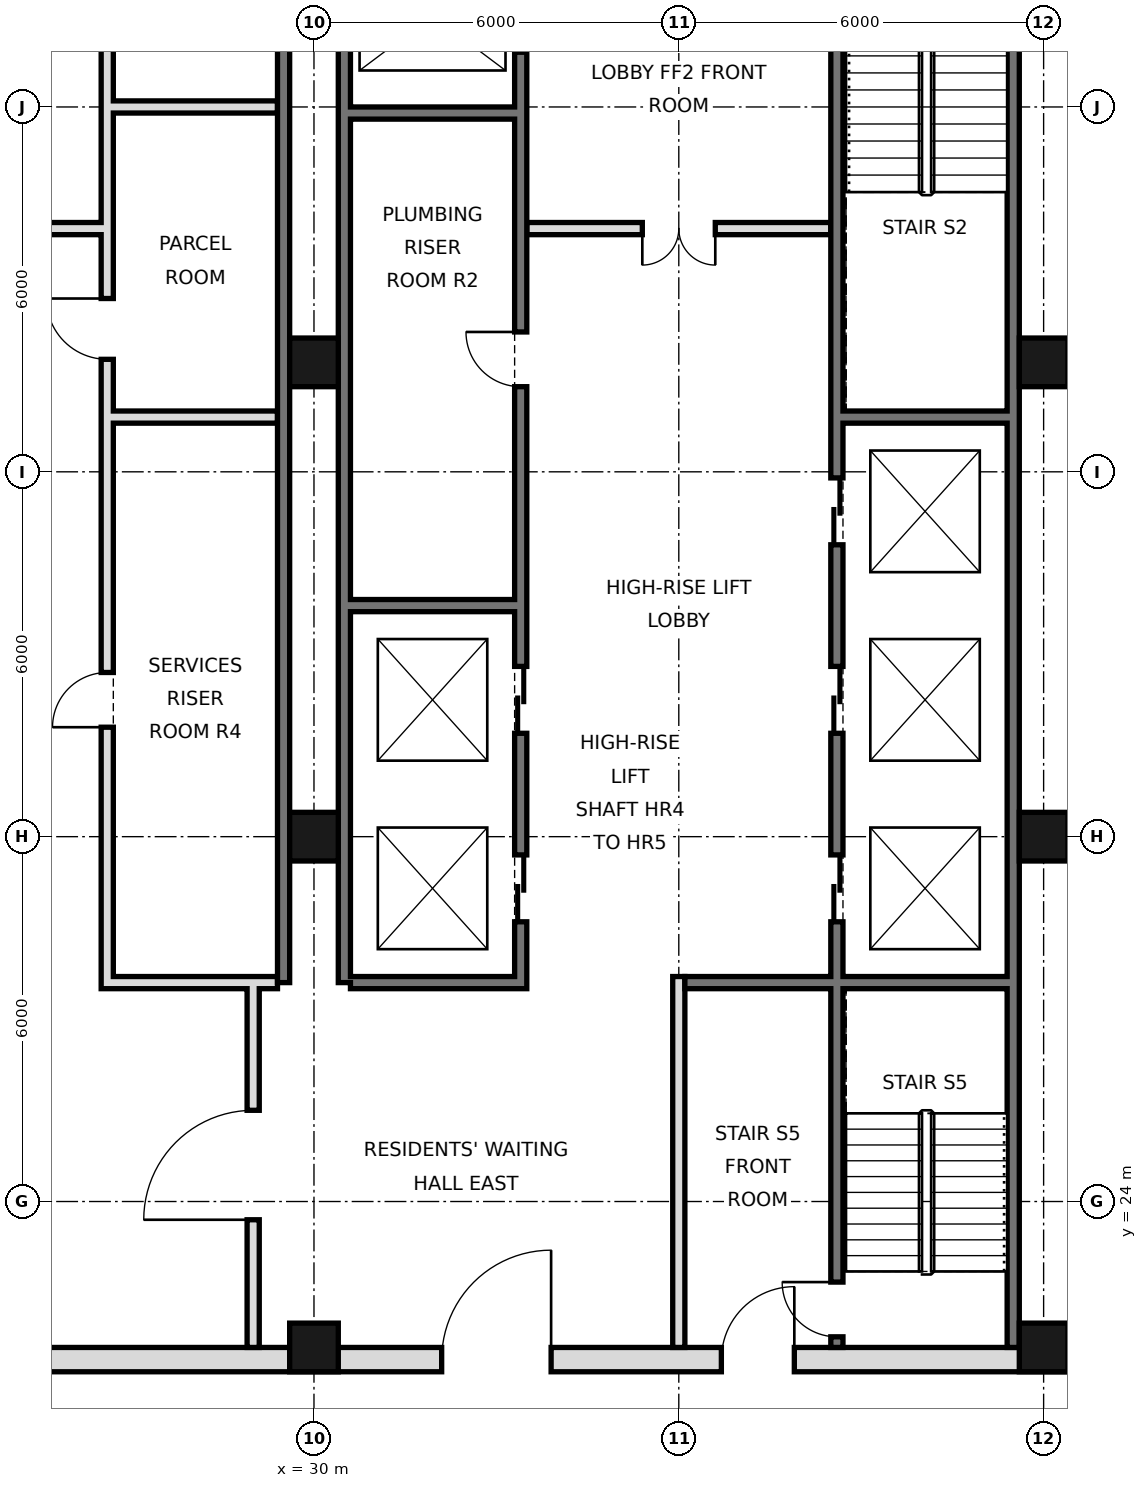
"""IFC4 building model, lengths in metres.
Left out: names, types, materials, properties, quantities, classifications, styles, units other than length and angle.
Written with IfcOpenShell. Run it as: python <this file> out.ifc"""

import sys

from ifc_helpers import new_model, si_unit, direction, frame, frame_2d, origin, origin_2d, place, context, subcontext, project, spatial, rectangle, hollow_rectangle, extrude, element, fill, save


model = new_model("IFC4")
c1 = context("Model", 3, precision=1e-05, world=origin(), true_north=direction((0.0, 1.0)))
c2 = subcontext(c1, "Body", "Model", "MODEL_VIEW")
j1 = project(units=[si_unit("LENGTHUNIT", "METRE"), si_unit("PLANEANGLEUNIT", "RADIAN")], contexts=[c1])
p1 = place(None, origin())
s1 = spatial("IfcSite", under=j1, at=p1, CompositionType="ELEMENT")
p2 = place(p1, origin())
s2 = spatial("IfcBuilding", under=s1, at=p2, CompositionType="ELEMENT")
p3 = place(p2, frame((0.0, 0.0, 202.8)))
s3 = spatial("IfcBuildingStorey", under=s2, at=p3, CompositionType="ELEMENT", Elevation=202.8)
for number, where, z_axis, x_axis in (
    (1, (30.0, 21.6, 0.0), (0.0, 0.0, 1.0), (1.0, 0.0, 0.0)),
    (2, (30.0, 30.0, 0.0), (0.0, 0.0, 1.0), (1.0, 0.0, 0.0)),
    (3, (30.0, 37.8, 0.0), (0.0, 0.0, 1.0), (1.0, 0.0, 0.0)),
    (4, (42.0, 21.6, 0.0), (0.0, 0.0, 1.0), (1.0, 0.0, 0.0)),
    (5, (42.0, 30.0, 0.0), (0.0, 0.0, 1.0), (1.0, 0.0, 0.0)),
    (6, (42.0, 37.8, 0.0), (0.0, 0.0, 1.0), (1.0, 0.0, 0.0)),
):
    element("IfcColumn", number, at=place(p3, frame(where, z_axis=z_axis, x_axis=x_axis)), inside=s3, PredefinedType="COLUMN", context=c2, shape_type="SweptSolid", body=[
        extrude(hollow_rectangle(XDim=0.8, YDim=0.8, WallThickness=0.04, at=origin_2d()), origin(), (0.0, 0.0, 1.0), 3.6),
    ])
p4 = place(p3, frame((41.5, 21.6, 0.0), z_axis=(0.0, 0.0, 1.0), x_axis=(0.0, 1.0, 0.0)))
e7 = element("IfcWall", 7, at=p4, inside=s3, PredefinedType="SOLIDWALL", context=c2, shape_type="SweptSolid", body=[
    extrude(rectangle(XDim=23.5, YDim=0.2, at=frame_2d((11.75, 0.0))), origin(), (0.0, 0.0, 1.0), 3.42),
])
for number, where, z_axis, x_axis in (
    (8, (29.5, 27.6, 0.0), (0.0, 0.0, 1.0), (0.0, 1.0, 0.0)),
    (9, (30.5, 27.6, 0.0), (0.0, 0.0, 1.0), (0.0, 1.0, 0.0)),
):
    element("IfcWall", number, at=place(p3, frame(where, z_axis=z_axis, x_axis=x_axis)), inside=s3, PredefinedType="SOLIDWALL", context=c2, shape_type="SweptSolid", body=[
        extrude(rectangle(XDim=17.5, YDim=0.2, at=frame_2d((8.75, 0.0))), origin(), (0.0, 0.0, 1.0), 3.42),
    ])
p5 = place(p3, frame((5.6, 21.4, 0.0), z_axis=(0.0, 0.0, 1.0), x_axis=(1.0, 0.0, 0.0)))
e10 = element("IfcWall", 10, at=p5, inside=s3, PredefinedType="SOLIDWALL", context=c2, shape_type="SweptSolid", body=[
    extrude(rectangle(XDim=36.8, YDim=0.4, at=frame_2d((18.4, 0.0))), origin(), (0.0, 0.0, 1.0), 3.42),
])
p6 = place(p5, frame((8.5, 0.0, 0.0)))
e11 = element("IfcOpeningElement", 11, at=p6, cuts=e10, PredefinedType="OPENING", context=c2, shape_type="SweptSolid", body=[
    extrude(rectangle(XDim=1.8, YDim=2.1, at=frame_2d((0.9, 1.05))), frame((0.0, 0.21, 0.0), z_axis=(0.0, -1.0, 0.0), x_axis=(1.0, 0.0, 0.0)), (0.0, 0.0, 1.0), 0.42),
])
p7 = place(p5, frame((17.5, 0.0, 0.0)))
e12 = element("IfcOpeningElement", 12, at=p7, cuts=e10, PredefinedType="OPENING", context=c2, shape_type="SweptSolid", body=[
    extrude(rectangle(XDim=1.8, YDim=2.1, at=frame_2d((0.9, 1.05))), frame((0.0, 0.21, 0.0), z_axis=(0.0, -1.0, 0.0), x_axis=(1.0, 0.0, 0.0)), (0.0, 0.0, 1.0), 0.42),
])
p8 = place(p5, frame((26.5, 0.0, 0.0)))
e13 = element("IfcOpeningElement", 13, at=p8, cuts=e10, PredefinedType="OPENING", context=c2, shape_type="SweptSolid", body=[
    extrude(rectangle(XDim=1.8, YDim=2.1, at=frame_2d((0.9, 1.05))), frame((0.0, 0.21, 0.0), z_axis=(0.0, -1.0, 0.0), x_axis=(1.0, 0.0, 0.0)), (0.0, 0.0, 1.0), 0.42),
])
p9 = place(p5, frame((4.5, 0.0, 0.0)))
e14 = element("IfcOpeningElement", 14, at=p9, cuts=e10, PredefinedType="OPENING", context=c2, shape_type="SweptSolid", body=[
    extrude(rectangle(XDim=1.2, YDim=2.1, at=frame_2d((0.6, 1.05))), frame((0.0, 0.21, 0.0), z_axis=(0.0, -1.0, 0.0), x_axis=(1.0, 0.0, 0.0)), (0.0, 0.0, 1.0), 0.42),
])
p10 = place(p5, frame((31.1, 0.0, 0.0)))
e15 = element("IfcOpeningElement", 15, at=p10, cuts=e10, PredefinedType="OPENING", context=c2, shape_type="SweptSolid", body=[
    extrude(rectangle(XDim=1.2, YDim=2.1, at=frame_2d((0.6, 1.05))), frame((0.0, 0.21, 0.0), z_axis=(0.0, -1.0, 0.0), x_axis=(1.0, 0.0, 0.0)), (0.0, 0.0, 1.0), 0.42),
])
p11 = place(p3, frame((29.0, 21.6, 0.0), z_axis=(0.0, 0.0, 1.0), x_axis=(0.0, 1.0, 0.0)))
e16 = element("IfcWall", 16, at=p11, inside=s3, PredefinedType="PARTITIONING", context=c2, shape_type="SweptSolid", body=[
    extrude(rectangle(XDim=6.0, YDim=0.2, at=frame_2d((3.0, 0.0))), origin(), (0.0, 0.0, 1.0), 3.42),
])
p12 = place(p11, frame((2.1, 0.0, 0.0)))
e17 = element("IfcOpeningElement", 17, at=p12, cuts=e16, PredefinedType="OPENING", context=c2, shape_type="SweptSolid", body=[
    extrude(rectangle(XDim=1.8, YDim=2.1, at=frame_2d((0.9, 1.05))), frame((0.0, 0.11, 0.0), z_axis=(0.0, -1.0, 0.0), x_axis=(1.0, 0.0, 0.0)), (0.0, 0.0, 1.0), 0.22),
])
p13 = place(p3, frame((26.6, 27.5, 0.0), z_axis=(0.0, 0.0, 1.0), x_axis=(0.0, 1.0, 0.0)))
e18 = element("IfcWall", 18, at=p13, inside=s3, PredefinedType="SOLIDWALL", context=c2, shape_type="SweptSolid", body=[
    extrude(rectangle(XDim=17.5, YDim=0.2, at=frame_2d((8.75, 0.0))), origin(), (0.0, 0.0, 1.0), 3.42),
])
p14 = place(p13, frame((4.3, 0.0, 0.0)))
e19 = element("IfcOpeningElement", 19, at=p14, cuts=e18, PredefinedType="OPENING", context=c2, shape_type="SweptSolid", body=[
    extrude(rectangle(XDim=0.9, YDim=2.1, at=frame_2d((0.45, 1.05))), frame((0.0, 0.11, 0.0), z_axis=(0.0, -1.0, 0.0), x_axis=(1.0, 0.0, 0.0)), (0.0, 0.0, 1.0), 0.22),
])
p15 = place(p13, frame((10.35, 0.0, 0.0)))
e20 = element("IfcOpeningElement", 20, at=p15, cuts=e18, PredefinedType="OPENING", context=c2, shape_type="SweptSolid", body=[
    extrude(rectangle(XDim=1.0, YDim=2.1, at=frame_2d((0.5, 1.05))), frame((0.0, 0.11, 0.0), z_axis=(0.0, -1.0, 0.0), x_axis=(1.0, 0.0, 0.0)), (0.0, 0.0, 1.0), 0.22),
])
p16 = place(p13, frame((15.475, 0.0, 0.0)))
e21 = element("IfcOpeningElement", 21, at=p16, cuts=e18, PredefinedType="OPENING", context=c2, shape_type="SweptSolid", body=[
    extrude(rectangle(XDim=1.0, YDim=2.1, at=frame_2d((0.5, 1.05))), frame((0.0, 0.11, 0.0), z_axis=(0.0, -1.0, 0.0), x_axis=(1.0, 0.0, 0.0)), (0.0, 0.0, 1.0), 0.22),
])
p17 = place(p3, frame((33.4, 27.5, 0.0), z_axis=(0.0, 0.0, 1.0), x_axis=(0.0, 1.0, 0.0)))
e22 = element("IfcWall", 22, at=p17, inside=s3, PredefinedType="SOLIDWALL", context=c2, shape_type="SweptSolid", body=[
    extrude(rectangle(XDim=17.5, YDim=0.2, at=frame_2d((8.75, 0.0))), origin(), (0.0, 0.0, 1.0), 3.42),
])
p18 = place(p17, frame((1.1, 0.0, 0.0)))
e23 = element("IfcOpeningElement", 23, at=p18, cuts=e22, PredefinedType="OPENING", context=c2, shape_type="SweptSolid", body=[
    extrude(rectangle(XDim=1.1, YDim=2.1, at=frame_2d((0.55, 1.05))), frame((0.0, 0.11, 0.0), z_axis=(0.0, -1.0, 0.0), x_axis=(1.0, 0.0, 0.0)), (0.0, 0.0, 1.0), 0.22),
])
p19 = place(p17, frame((4.2, 0.0, 0.0)))
e24 = element("IfcOpeningElement", 24, at=p19, cuts=e22, PredefinedType="OPENING", context=c2, shape_type="SweptSolid", body=[
    extrude(rectangle(XDim=1.1, YDim=2.1, at=frame_2d((0.55, 1.05))), frame((0.0, 0.11, 0.0), z_axis=(0.0, -1.0, 0.0), x_axis=(1.0, 0.0, 0.0)), (0.0, 0.0, 1.0), 0.22),
])
p20 = place(p17, frame((15.4, 0.0, 0.0)))
e25 = element("IfcOpeningElement", 25, at=p20, cuts=e22, PredefinedType="OPENING", context=c2, shape_type="SweptSolid", body=[
    extrude(rectangle(XDim=1.1, YDim=2.1, at=frame_2d((0.55, 1.05))), frame((0.0, 0.11, 0.0), z_axis=(0.0, -1.0, 0.0), x_axis=(1.0, 0.0, 0.0)), (0.0, 0.0, 1.0), 0.22),
])
p21 = place(p17, frame((9.9, 0.0, 0.0)))
e26 = element("IfcOpeningElement", 26, at=p21, cuts=e22, PredefinedType="OPENING", context=c2, shape_type="SweptSolid", body=[
    extrude(rectangle(XDim=0.9, YDim=2.1, at=frame_2d((0.45, 1.05))), frame((0.0, 0.11, 0.0), z_axis=(0.0, -1.0, 0.0), x_axis=(1.0, 0.0, 0.0)), (0.0, 0.0, 1.0), 0.22),
])
p22 = place(p3, frame((36.0, 21.6, 0.0), z_axis=(0.0, 0.0, 1.0), x_axis=(0.0, 1.0, 0.0)))
e27 = element("IfcWall", 27, at=p22, inside=s3, PredefinedType="PARTITIONING", context=c2, shape_type="SweptSolid", body=[
    extrude(rectangle(XDim=6.1, YDim=0.2, at=frame_2d((3.05, 0.0))), origin(), (0.0, 0.0, 1.0), 3.42),
])
p23 = place(p3, frame((38.6, 21.6, 0.0), z_axis=(0.0, 0.0, 1.0), x_axis=(0.0, 1.0, 0.0)))
e28 = element("IfcWall", 28, at=p23, inside=s3, PredefinedType="SOLIDWALL", context=c2, shape_type="SweptSolid", body=[
    extrude(rectangle(XDim=23.4, YDim=0.2, at=frame_2d((11.7, 0.0))), origin(), (0.0, 0.0, 1.0), 3.42),
])
p24 = place(p23, frame((7.0, 0.0, 0.0)))
e29 = element("IfcOpeningElement", 29, at=p24, cuts=e28, PredefinedType="OPENING", context=c2, shape_type="SweptSolid", body=[
    extrude(rectangle(XDim=1.1, YDim=2.1, at=frame_2d((0.55, 1.05))), frame((0.0, 0.11, 0.0), z_axis=(0.0, -1.0, 0.0), x_axis=(1.0, 0.0, 0.0)), (0.0, 0.0, 1.0), 0.22),
])
p25 = place(p23, frame((10.1, 0.0, 0.0)))
e30 = element("IfcOpeningElement", 30, at=p25, cuts=e28, PredefinedType="OPENING", context=c2, shape_type="SweptSolid", body=[
    extrude(rectangle(XDim=1.1, YDim=2.1, at=frame_2d((0.55, 1.05))), frame((0.0, 0.11, 0.0), z_axis=(0.0, -1.0, 0.0), x_axis=(1.0, 0.0, 0.0)), (0.0, 0.0, 1.0), 0.22),
])
p26 = place(p23, frame((13.2, 0.0, 0.0)))
e31 = element("IfcOpeningElement", 31, at=p26, cuts=e28, PredefinedType="OPENING", context=c2, shape_type="SweptSolid", body=[
    extrude(rectangle(XDim=1.1, YDim=2.1, at=frame_2d((0.55, 1.05))), frame((0.0, 0.11, 0.0), z_axis=(0.0, -1.0, 0.0), x_axis=(1.0, 0.0, 0.0)), (0.0, 0.0, 1.0), 0.22),
])
p27 = place(p23, frame((22.1, 0.0, 0.0)))
e32 = element("IfcOpeningElement", 32, at=p27, cuts=e28, PredefinedType="OPENING", context=c2, shape_type="SweptSolid", body=[
    extrude(rectangle(XDim=1.0, YDim=2.1, at=frame_2d((0.5, 1.05))), frame((0.0, 0.11, 0.0), z_axis=(0.0, -1.0, 0.0), x_axis=(1.0, 0.0, 0.0)), (0.0, 0.0, 1.0), 0.22),
])
p28 = place(p23, frame((0.175, 0.0, 0.0)))
e33 = element("IfcOpeningElement", 33, at=p28, cuts=e28, PredefinedType="OPENING", context=c2, shape_type="SweptSolid", body=[
    extrude(rectangle(XDim=0.9, YDim=2.1, at=frame_2d((0.45, 1.05))), frame((0.0, 0.11, 0.0), z_axis=(0.0, -1.0, 0.0), x_axis=(1.0, 0.0, 0.0)), (0.0, 0.0, 1.0), 0.22),
])
for number, where, z_axis, x_axis in (
    (34, (26.7, 27.6, 0.0), (0.0, 0.0, 1.0), (1.0, 0.0, 0.0)),
    (35, (30.6, 27.6, 0.0), (0.0, 0.0, 1.0), (1.0, 0.0, 0.0)),
):
    element("IfcWall", number, at=place(p3, frame(where, z_axis=z_axis, x_axis=x_axis)), inside=s3, PredefinedType="SOLIDWALL", context=c2, shape_type="SweptSolid", body=[
        extrude(rectangle(XDim=2.7, YDim=0.2, at=frame_2d((1.35, 0.0))), origin(), (0.0, 0.0, 1.0), 3.42),
    ])
p29 = place(p3, frame((36.1, 27.6, 0.0), z_axis=(0.0, 0.0, 1.0), x_axis=(1.0, 0.0, 0.0)))
e36 = element("IfcWall", 36, at=p29, inside=s3, PredefinedType="SOLIDWALL", context=c2, shape_type="SweptSolid", body=[
    extrude(rectangle(XDim=5.3, YDim=0.2, at=frame_2d((2.65, 0.0))), origin(), (0.0, 0.0, 1.0), 3.42),
])
for number, where, z_axis, x_axis in (
    (37, (30.6, 33.8, 0.0), (0.0, 0.0, 1.0), (1.0, 0.0, 0.0)),
    (38, (26.7, 36.9, 0.0), (0.0, 0.0, 1.0), (1.0, 0.0, 0.0)),
    (39, (38.7, 36.9, 0.0), (0.0, 0.0, 1.0), (1.0, 0.0, 0.0)),
):
    element("IfcWall", number, at=place(p3, frame(where, z_axis=z_axis, x_axis=x_axis)), inside=s3, PredefinedType="SOLIDWALL", context=c2, shape_type="SweptSolid", body=[
        extrude(rectangle(XDim=2.7, YDim=0.2, at=frame_2d((1.35, 0.0))), origin(), (0.0, 0.0, 1.0), 3.42),
    ])
p30 = place(p3, frame((21.5, 40.0, 0.0), z_axis=(0.0, 0.0, 1.0), x_axis=(1.0, 0.0, 0.0)))
e40 = element("IfcWall", 40, at=p30, inside=s3, PredefinedType="PARTITIONING", context=c2, shape_type="SweptSolid", body=[
    extrude(rectangle(XDim=5.0, YDim=0.2, at=frame_2d((2.5, 0.0))), origin(), (0.0, 0.0, 1.0), 3.42),
])
p31 = place(p30, frame((1.9, 0.0, 0.0)))
e41 = element("IfcOpeningElement", 41, at=p31, cuts=e40, PredefinedType="OPENING", context=c2, shape_type="SweptSolid", body=[
    extrude(rectangle(XDim=1.2, YDim=2.1, at=frame_2d((0.6, 1.05))), frame((0.0, 0.11, 0.0), z_axis=(0.0, -1.0, 0.0), x_axis=(1.0, 0.0, 0.0)), (0.0, 0.0, 1.0), 0.22),
])
p32 = place(p3, frame((33.5, 40.0, 0.0), z_axis=(0.0, 0.0, 1.0), x_axis=(1.0, 0.0, 0.0)))
e42 = element("IfcWall", 42, at=p32, inside=s3, PredefinedType="PARTITIONING", context=c2, shape_type="SweptSolid", body=[
    extrude(rectangle(XDim=5.0, YDim=0.2, at=frame_2d((2.5, 0.0))), origin(), (0.0, 0.0, 1.0), 3.42),
])
p33 = place(p32, frame((1.9, 0.0, 0.0)))
e43 = element("IfcOpeningElement", 43, at=p33, cuts=e42, PredefinedType="OPENING", context=c2, shape_type="SweptSolid", body=[
    extrude(rectangle(XDim=1.2, YDim=2.1, at=frame_2d((0.6, 1.05))), frame((0.0, 0.11, 0.0), z_axis=(0.0, -1.0, 0.0), x_axis=(1.0, 0.0, 0.0)), (0.0, 0.0, 1.0), 0.22),
])
p34 = place(p3, frame((30.6, 41.9, 0.0), z_axis=(0.0, 0.0, 1.0), x_axis=(1.0, 0.0, 0.0)))
e44 = element("IfcWall", 44, at=p34, inside=s3, PredefinedType="SOLIDWALL", context=c2, shape_type="SweptSolid", body=[
    extrude(rectangle(XDim=2.7, YDim=0.2, at=frame_2d((1.35, 0.0))), origin(), (0.0, 0.0, 1.0), 3.42),
])
p35 = place(p3, frame((26.7, 42.0, 0.0), z_axis=(0.0, 0.0, 1.0), x_axis=(1.0, 0.0, 0.0)))
e45 = element("IfcWall", 45, at=p35, inside=s3, PredefinedType="PARTITIONING", context=c2, shape_type="SweptSolid", body=[
    extrude(rectangle(XDim=2.7, YDim=0.2, at=frame_2d((1.35, 0.0))), origin(), (0.0, 0.0, 1.0), 3.42),
])
p36 = place(p12, origin())
e46 = element("IfcDoor", 46, at=p36, inside=s3, OperationType="SINGLE_SWING_LEFT", PredefinedType="DOOR", context=c2, shape_type="SweptSolid", body=[
    extrude(rectangle(XDim=1.8, YDim=2.1, at=frame_2d((0.9, 1.05))), frame((0.0, 0.025, 0.0), z_axis=(0.0, -1.0, 0.0), x_axis=(1.0, 0.0, 0.0)), (0.0, 0.0, 1.0), 0.05),
])
fill(e17, e46)
p37 = place(p8, frame((1.8, 0.0, 0.0), z_axis=(0.0, 0.0, 1.0), x_axis=(-1.0, 0.0, 0.0)))
e47 = element("IfcDoor", 47, at=p37, inside=s3, OperationType="SINGLE_SWING_LEFT", PredefinedType="DOOR", context=c2, shape_type="SweptSolid", body=[
    extrude(rectangle(XDim=1.8, YDim=2.1, at=frame_2d((0.9, 1.05))), frame((0.0, 0.025, 0.0), z_axis=(0.0, -1.0, 0.0), x_axis=(1.0, 0.0, 0.0)), (0.0, 0.0, 1.0), 0.05),
])
fill(e13, e47)
p38 = place(p10, frame((1.2, 0.0, 0.0), z_axis=(0.0, 0.0, 1.0), x_axis=(-1.0, 0.0, 0.0)))
e48 = element("IfcDoor", 48, at=p38, inside=s3, OperationType="SINGLE_SWING_LEFT", PredefinedType="DOOR", context=c2, shape_type="SweptSolid", body=[
    extrude(rectangle(XDim=1.2, YDim=2.1, at=frame_2d((0.6, 1.05))), frame((0.0, 0.025, 0.0), z_axis=(0.0, -1.0, 0.0), x_axis=(1.0, 0.0, 0.0)), (0.0, 0.0, 1.0), 0.05),
])
fill(e15, e48)
p39 = place(p33, frame((1.2, 0.0, 0.0), z_axis=(0.0, 0.0, 1.0), x_axis=(-1.0, 0.0, 0.0)))
e49 = element("IfcDoor", 49, at=p39, inside=s3, OperationType="DOUBLE_DOOR_SINGLE_SWING", PredefinedType="DOOR", context=c2, shape_type="SweptSolid", body=[
    extrude(rectangle(XDim=1.2, YDim=2.1, at=frame_2d((0.6, 1.05))), frame((0.0, 0.025, 0.0), z_axis=(0.0, -1.0, 0.0), x_axis=(1.0, 0.0, 0.0)), (0.0, 0.0, 1.0), 0.05),
])
fill(e43, e49)
p40 = place(p24, origin())
e50 = element("IfcDoor", 50, at=p40, inside=s3, OperationType="DOUBLE_DOOR_SLIDING", PredefinedType="DOOR", context=c2, shape_type="SweptSolid", body=[
    extrude(rectangle(XDim=1.1, YDim=2.1, at=frame_2d((0.55, 1.05))), frame((0.0, 0.025, 0.0), z_axis=(0.0, -1.0, 0.0), x_axis=(1.0, 0.0, 0.0)), (0.0, 0.0, 1.0), 0.05),
])
fill(e29, e50)
p41 = place(p25, origin())
e51 = element("IfcDoor", 51, at=p41, inside=s3, OperationType="DOUBLE_DOOR_SLIDING", PredefinedType="DOOR", context=c2, shape_type="SweptSolid", body=[
    extrude(rectangle(XDim=1.1, YDim=2.1, at=frame_2d((0.55, 1.05))), frame((0.0, 0.025, 0.0), z_axis=(0.0, -1.0, 0.0), x_axis=(1.0, 0.0, 0.0)), (0.0, 0.0, 1.0), 0.05),
])
fill(e30, e51)
p42 = place(p26, origin())
e52 = element("IfcDoor", 52, at=p42, inside=s3, OperationType="DOUBLE_DOOR_SLIDING", PredefinedType="DOOR", context=c2, shape_type="SweptSolid", body=[
    extrude(rectangle(XDim=1.1, YDim=2.1, at=frame_2d((0.55, 1.05))), frame((0.0, 0.025, 0.0), z_axis=(0.0, -1.0, 0.0), x_axis=(1.0, 0.0, 0.0)), (0.0, 0.0, 1.0), 0.05),
])
fill(e31, e52)
p43 = place(p18, origin())
e53 = element("IfcDoor", 53, at=p43, inside=s3, OperationType="DOUBLE_DOOR_SLIDING", PredefinedType="DOOR", context=c2, shape_type="SweptSolid", body=[
    extrude(rectangle(XDim=1.1, YDim=2.1, at=frame_2d((0.55, 1.05))), frame((0.0, 0.025, 0.0), z_axis=(0.0, -1.0, 0.0), x_axis=(1.0, 0.0, 0.0)), (0.0, 0.0, 1.0), 0.05),
])
fill(e23, e53)
p44 = place(p19, origin())
e54 = element("IfcDoor", 54, at=p44, inside=s3, OperationType="DOUBLE_DOOR_SLIDING", PredefinedType="DOOR", context=c2, shape_type="SweptSolid", body=[
    extrude(rectangle(XDim=1.1, YDim=2.1, at=frame_2d((0.55, 1.05))), frame((0.0, 0.025, 0.0), z_axis=(0.0, -1.0, 0.0), x_axis=(1.0, 0.0, 0.0)), (0.0, 0.0, 1.0), 0.05),
])
fill(e24, e54)
p45 = place(p28, frame((0.9, 0.0, 0.0), z_axis=(0.0, 0.0, 1.0), x_axis=(-1.0, 0.0, 0.0)))
e55 = element("IfcDoor", 55, at=p45, inside=s3, OperationType="SINGLE_SWING_LEFT", PredefinedType="DOOR", context=c2, shape_type="SweptSolid", body=[
    extrude(rectangle(XDim=0.9, YDim=2.1, at=frame_2d((0.45, 1.05))), frame((0.0, 0.025, 0.0), z_axis=(0.0, -1.0, 0.0), x_axis=(1.0, 0.0, 0.0)), (0.0, 0.0, 1.0), 0.05),
])
fill(e33, e55)
p46 = place(p21, frame((0.9, 0.0, 0.0), z_axis=(0.0, 0.0, 1.0), x_axis=(-1.0, 0.0, 0.0)))
e56 = element("IfcDoor", 56, at=p46, inside=s3, OperationType="SINGLE_SWING_LEFT", PredefinedType="DOOR", context=c2, shape_type="SweptSolid", body=[
    extrude(rectangle(XDim=0.9, YDim=2.1, at=frame_2d((0.45, 1.05))), frame((0.0, 0.025, 0.0), z_axis=(0.0, -1.0, 0.0), x_axis=(1.0, 0.0, 0.0)), (0.0, 0.0, 1.0), 0.05),
])
fill(e26, e56)
p47 = place(p14, origin())
e57 = element("IfcDoor", 57, at=p47, inside=s3, OperationType="SINGLE_SWING_LEFT", PredefinedType="DOOR", context=c2, shape_type="SweptSolid", body=[
    extrude(rectangle(XDim=0.9, YDim=2.1, at=frame_2d((0.45, 1.05))), frame((0.0, 0.025, 0.0), z_axis=(0.0, -1.0, 0.0), x_axis=(1.0, 0.0, 0.0)), (0.0, 0.0, 1.0), 0.05),
])
fill(e19, e57)
p48 = place(p15, frame((1.0, 0.0, 0.0), z_axis=(0.0, 0.0, 1.0), x_axis=(-1.0, 0.0, 0.0)))
e58 = element("IfcDoor", 58, at=p48, inside=s3, OperationType="SINGLE_SWING_LEFT", PredefinedType="DOOR", context=c2, shape_type="SweptSolid", body=[
    extrude(rectangle(XDim=1.0, YDim=2.1, at=frame_2d((0.5, 1.05))), frame((0.0, 0.025, 0.0), z_axis=(0.0, -1.0, 0.0), x_axis=(1.0, 0.0, 0.0)), (0.0, 0.0, 1.0), 0.05),
])
fill(e20, e58)
save(model, sys.argv[1])
